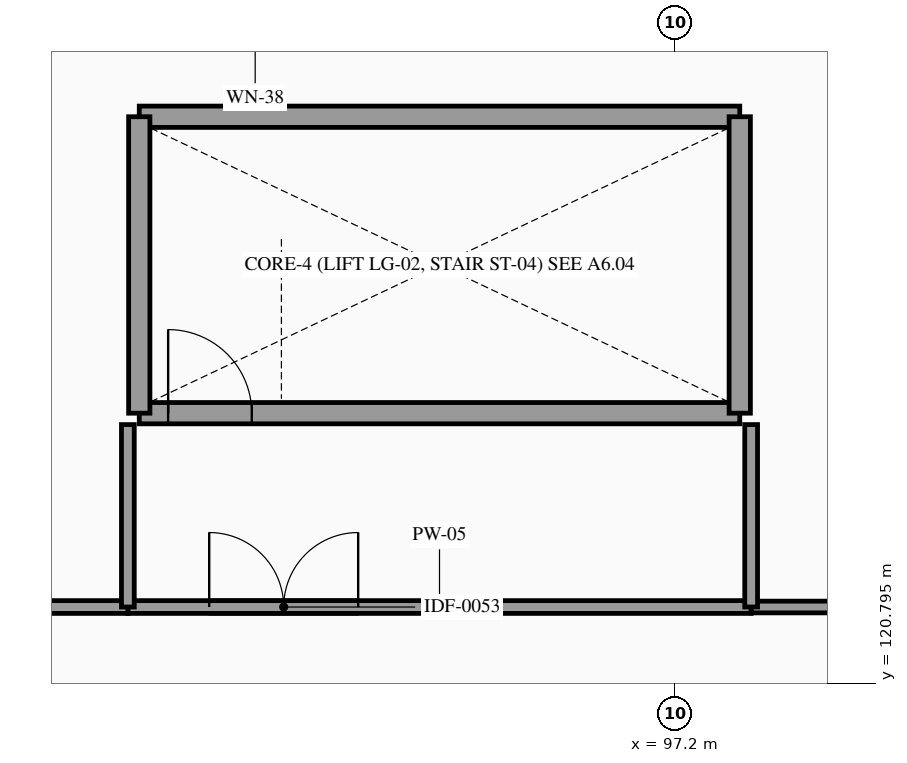
"""IFC4 building model, lengths in metres.
Left out: names, types, materials, properties, quantities, classifications, styles, units other than length and angle.
Written with IfcOpenShell. Run it as: python <this file> out.ifc"""

import sys

from ifc_helpers import new_model, si_unit, direction, frame, frame_2d, origin, place, context, subcontext, project, spatial, rectangle, extrude, element, fill, save


model = new_model("IFC4")
c1 = context("Model", 3, precision=1e-05, world=origin(), true_north=direction((0.0, 1.0)))
c2 = subcontext(c1, "Body", "Model", "MODEL_VIEW")
j1 = project(units=[si_unit("LENGTHUNIT", "METRE"), si_unit("PLANEANGLEUNIT", "RADIAN")], contexts=[c1])
p1 = place(None, origin())
s1 = spatial("IfcSite", under=j1, at=p1, CompositionType="ELEMENT")
p2 = place(p1, origin())
s2 = spatial("IfcBuilding", under=s1, at=p2, CompositionType="ELEMENT")
p3 = place(p2, frame((0.0, 0.0, 5.4)))
s3 = spatial("IfcBuildingStorey", under=s2, at=p3, CompositionType="ELEMENT", Elevation=5.4)
p4 = place(p3, frame((90.15, 124.35, 0.0), z_axis=(0.0, 0.0, 1.0), x_axis=(1.0, 0.0, 0.0)))
e1 = element("IfcWall", 1, at=p4, inside=s3, PredefinedType="SHEAR", context=c2, shape_type="SweptSolid", body=[
    extrude(rectangle(XDim=7.9, YDim=0.28, at=frame_2d((3.95, 0.0))), origin(), (0.0, 0.0, 1.0), 4.68),
])
p5 = place(p4, frame((0.38, 0.0, 0.0)))
e2 = element("IfcOpeningElement", 2, at=p5, cuts=e1, PredefinedType="OPENING", context=c2, shape_type="SweptSolid", body=[
    extrude(rectangle(XDim=1.1, YDim=2.2, at=frame_2d((0.55, 1.1))), frame((0.0, 0.15, 0.0), z_axis=(0.0, -1.0, 0.0), x_axis=(1.0, 0.0, 0.0)), (0.0, 0.0, 1.0), 0.3),
])
p6 = place(p3, frame((90.15, 128.25, 0.0), z_axis=(0.0, 0.0, 1.0), x_axis=(1.0, 0.0, 0.0)))
e3 = element("IfcWall", 3, at=p6, inside=s3, PredefinedType="SHEAR", context=c2, shape_type="SweptSolid", body=[
    extrude(rectangle(XDim=7.9, YDim=0.28, at=frame_2d((3.95, 0.0))), origin(), (0.0, 0.0, 1.0), 4.68),
])
for number, where, z_axis, x_axis in (
    (4, (90.15, 124.35, 0.0), (0.0, 0.0, 1.0), (0.0, 1.0, 0.0)),
    (5, (98.05, 124.35, 0.0), (0.0, 0.0, 1.0), (0.0, 1.0, 0.0)),
):
    element("IfcWall", number, at=place(p3, frame(where, z_axis=z_axis, x_axis=x_axis)), inside=s3, PredefinedType="SHEAR", context=c2, shape_type="SweptSolid", body=[
        extrude(rectangle(XDim=3.9, YDim=0.28, at=frame_2d((1.95, 0.0))), origin(), (0.0, 0.0, 1.0), 4.68),
    ])
p7 = place(p3, frame((90.0, 121.8, 0.0), z_axis=(0.0, 0.0, 1.0), x_axis=(1.0, 0.0, 0.0)))
e6 = element("IfcWall", 6, at=p7, inside=s3, PredefinedType="PARTITIONING", context=c2, shape_type="SweptSolid", body=[
    extrude(rectangle(XDim=8.2, YDim=0.168, at=frame_2d((4.1, 0.0))), origin(), (0.0, 0.0, 1.0), 3.23),
])
p8 = place(p7, frame((1.07, 0.0, 0.0)))
e7 = element("IfcOpeningElement", 7, at=p8, cuts=e6, PredefinedType="OPENING", context=c2, shape_type="SweptSolid", body=[
    extrude(rectangle(XDim=1.96, YDim=2.3, at=frame_2d((0.98, 1.15))), frame((0.0, 0.094, 0.0), z_axis=(0.0, -1.0, 0.0), x_axis=(1.0, 0.0, 0.0)), (0.0, 0.0, 1.0), 0.188),
])
p9 = place(p3, frame((60.02, 121.8, 0.0), z_axis=(0.0, 0.0, 1.0), x_axis=(1.0, 0.0, 0.0)))
e8 = element("IfcWall", 8, at=p9, inside=s3, PredefinedType="PARTITIONING", context=c2, shape_type="SweptSolid", body=[
    extrude(rectangle(XDim=29.98, YDim=0.168, at=frame_2d((14.99, 0.0))), origin(), (0.0, 0.0, 1.0), 3.23),
])
p10 = place(p3, frame((90.0, 121.8, 0.0), z_axis=(0.0, 0.0, 1.0), x_axis=(0.0, 1.0, 0.0)))
e9 = element("IfcWall", 9, at=p10, inside=s3, PredefinedType="PARTITIONING", context=c2, shape_type="SweptSolid", body=[
    extrude(rectangle(XDim=2.4, YDim=0.168, at=frame_2d((1.2, 0.0))), origin(), (0.0, 0.0, 1.0), 3.23),
])
p11 = place(p3, frame((98.2, 121.8, 0.0), z_axis=(0.0, 0.0, 1.0), x_axis=(1.0, 0.0, 0.0)))
e10 = element("IfcWall", 10, at=p11, inside=s3, PredefinedType="PARTITIONING", context=c2, shape_type="SweptSolid", body=[
    extrude(rectangle(XDim=4.38, YDim=0.154, at=frame_2d((2.19, 0.0))), origin(), (0.0, 0.0, 1.0), 3.23),
])
p12 = place(p3, frame((98.2, 121.8, 0.0), z_axis=(0.0, 0.0, 1.0), x_axis=(0.0, 1.0, 0.0)))
e11 = element("IfcWall", 11, at=p12, inside=s3, PredefinedType="PARTITIONING", context=c2, shape_type="SweptSolid", body=[
    extrude(rectangle(XDim=2.4, YDim=0.168, at=frame_2d((1.2, 0.0))), origin(), (0.0, 0.0, 1.0), 3.23),
])
p13 = place(p5, frame((1.1, 0.0, 0.0), z_axis=(0.0, 0.0, 1.0), x_axis=(-1.0, 0.0, 0.0)))
e12 = element("IfcDoor", 12, at=p13, inside=s3, OperationType="SINGLE_SWING_LEFT", PredefinedType="DOOR", context=c2, shape_type="SweptSolid", body=[
    extrude(rectangle(XDim=1.1, YDim=2.2, at=frame_2d((0.55, 1.1))), frame((0.0, 0.025, 0.0), z_axis=(0.0, -1.0, 0.0), x_axis=(1.0, 0.0, 0.0)), (0.0, 0.0, 1.0), 0.05),
])
fill(e2, e12)
p14 = place(p8, origin())
e13 = element("IfcDoor", 13, at=p14, inside=s3, OperationType="DOUBLE_DOOR_SINGLE_SWING", PredefinedType="DOOR", context=c2, shape_type="SweptSolid", body=[
    extrude(rectangle(XDim=1.96, YDim=2.3, at=frame_2d((0.98, 1.15))), frame((0.0, 0.025, 0.0), z_axis=(0.0, -1.0, 0.0), x_axis=(1.0, 0.0, 0.0)), (0.0, 0.0, 1.0), 0.05),
])
fill(e7, e13)
save(model, sys.argv[1])
